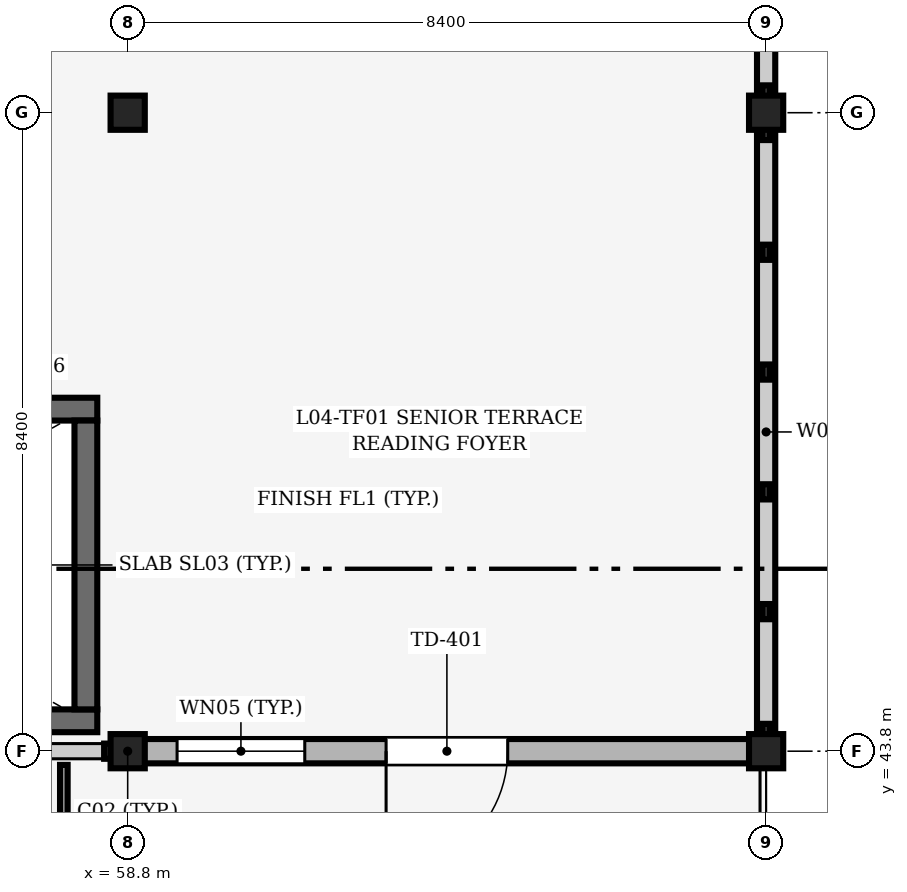
"""IFC4 building model, lengths in metres.
Left out: names, types, materials, properties, quantities, classifications, styles, units other than length and angle.
Written with IfcOpenShell. Run it as: python <this file> out.ifc"""

import sys

from ifc_helpers import new_model, si_unit, direction, frame, frame_2d, origin, origin_2d, place, context, subcontext, project, spatial, rectangle, extrude, element, fill, save


model = new_model("IFC4")
c1 = context("Model", 3, precision=1e-05, world=origin(), true_north=direction((0.0, 1.0)))
c2 = subcontext(c1, "Body", "Model", "MODEL_VIEW")
j1 = project(units=[si_unit("LENGTHUNIT", "METRE"), si_unit("PLANEANGLEUNIT", "RADIAN")], contexts=[c1])
p1 = place(None, origin())
s1 = spatial("IfcSite", under=j1, at=p1, CompositionType="ELEMENT")
p2 = place(p1, origin())
s2 = spatial("IfcBuilding", under=s1, at=p2, CompositionType="ELEMENT")
p3 = place(p2, frame((0.0, 0.0, 17.4)))
s3 = spatial("IfcBuildingStorey", under=s2, at=p3, CompositionType="ELEMENT", Elevation=17.4)
for number, where, z_axis, x_axis in (
    (1, (58.8, 43.8, 0.0), (0.0, 0.0, 1.0), (1.0, 0.0, 0.0)),
    (2, (58.8, 52.2, 0.0), (0.0, 0.0, 1.0), (1.0, 0.0, 0.0)),
    (3, (67.2, 43.8, 0.0), (0.0, 0.0, 1.0), (1.0, 0.0, 0.0)),
    (4, (67.2, 52.2, 0.0), (0.0, 0.0, 1.0), (1.0, 0.0, 0.0)),
):
    element("IfcColumn", number, at=place(p3, frame(where, z_axis=z_axis, x_axis=x_axis)), inside=s3, PredefinedType="COLUMN", context=c2, shape_type="SweptSolid", body=[
        extrude(rectangle(XDim=0.45, YDim=0.45, at=origin_2d()), origin(), (0.0, 0.0, 1.0), 4.2),
    ])
p4 = place(p3, frame((59.0, 43.8, 0.0), z_axis=(0.0, 0.0, 1.0), x_axis=(1.0, 0.0, 0.0)))
e5 = element("IfcWall", 5, at=p4, inside=s3, PredefinedType="SOLIDWALL", context=c2, shape_type="SweptSolid", body=[
    extrude(rectangle(XDim=8.0, YDim=0.32, at=frame_2d((4.0, 0.0))), origin(), (0.0, 0.0, 1.0), 3.48),
])
p5 = place(p4, frame((4.8, 0.0, 0.0), z_axis=(0.0, 0.0, 1.0), x_axis=(-1.0, 0.0, 0.0)))
e6 = element("IfcOpeningElement", 6, at=p5, cuts=e5, PredefinedType="OPENING", context=c2, shape_type="SweptSolid", body=[
    extrude(rectangle(XDim=1.6, YDim=2.3, at=frame_2d((0.8, 1.15))), frame((0.0, 0.17, 0.0), z_axis=(0.0, -1.0, 0.0), x_axis=(1.0, 0.0, 0.0)), (0.0, 0.0, 1.0), 0.34),
])
p6 = place(p4, frame((0.45, 0.0, 0.95)))
e7 = element("IfcOpeningElement", 7, at=p6, cuts=e5, PredefinedType="OPENING", context=c2, shape_type="SweptSolid", body=[
    extrude(rectangle(XDim=1.68, YDim=1.8, at=frame_2d((0.84, 0.9))), frame((0.0, 0.17, 0.0), z_axis=(0.0, -1.0, 0.0), x_axis=(1.0, 0.0, 0.0)), (0.0, 0.0, 1.0), 0.34),
])
for number, where, z_axis, x_axis in (
    (8, (67.2, 44.0, 0.0), (0.0, 0.0, 1.0), (0.0, 1.0, 0.0)),
    (9, (67.2, 52.4, 0.0), (0.0, 0.0, 1.0), (0.0, 1.0, 0.0)),
):
    element("IfcWall", number, at=place(p3, frame(where, z_axis=z_axis, x_axis=x_axis)), inside=s3, PredefinedType="SOLIDWALL", context=c2, shape_type="SweptSolid", body=[
        extrude(rectangle(XDim=8.0, YDim=0.24, at=frame_2d((4.0, 0.0))), origin(), (0.0, 0.0, 1.0), 1.15),
    ])
for number, where, z_axis, x_axis in (
    (10, (50.8, 44.2, 0.0), (0.0, 0.0, 1.0), (1.0, 0.0, 0.0)),
    (11, (50.8, 48.3, 0.0), (0.0, 0.0, 1.0), (1.0, 0.0, 0.0)),
):
    element("IfcWall", number, at=place(p3, frame(where, z_axis=z_axis, x_axis=x_axis)), inside=s3, PredefinedType="SHEAR", context=c2, shape_type="SweptSolid", body=[
        extrude(rectangle(XDim=7.6, YDim=0.3, at=frame_2d((3.8, 0.0))), origin(), (0.0, 0.0, 1.0), 4.025),
    ])
p7 = place(p3, frame((58.25, 44.35, 0.0), z_axis=(0.0, 0.0, 1.0), x_axis=(0.0, 1.0, 0.0)))
e12 = element("IfcWall", 12, at=p7, inside=s3, PredefinedType="SHEAR", context=c2, shape_type="SweptSolid", body=[
    extrude(rectangle(XDim=3.8, YDim=0.3, at=frame_2d((1.9, 0.0))), origin(), (0.0, 0.0, 1.0), 4.025),
])
p8 = place(p5, origin())
e13 = element("IfcDoor", 13, at=p8, inside=s3, OperationType="DOUBLE_DOOR_SINGLE_SWING", PredefinedType="DOOR", context=c2, shape_type="SweptSolid", body=[
    extrude(rectangle(XDim=1.6, YDim=2.3, at=frame_2d((0.8, 1.15))), frame((0.0, 0.025, 0.0), z_axis=(0.0, -1.0, 0.0), x_axis=(1.0, 0.0, 0.0)), (0.0, 0.0, 1.0), 0.05),
])
fill(e6, e13)
p9 = place(p6, origin())
e14 = element("IfcWindow", 14, at=p9, inside=s3, PartitioningType="SINGLE_PANEL", PredefinedType="WINDOW", context=c2, shape_type="SweptSolid", body=[
    extrude(rectangle(XDim=1.68, YDim=1.8, at=frame_2d((0.84, 0.9))), frame((0.0, 0.03, 0.0), z_axis=(0.0, -1.0, 0.0), x_axis=(1.0, 0.0, 0.0)), (0.0, 0.0, 1.0), 0.06),
])
fill(e7, e14)
save(model, sys.argv[1])
